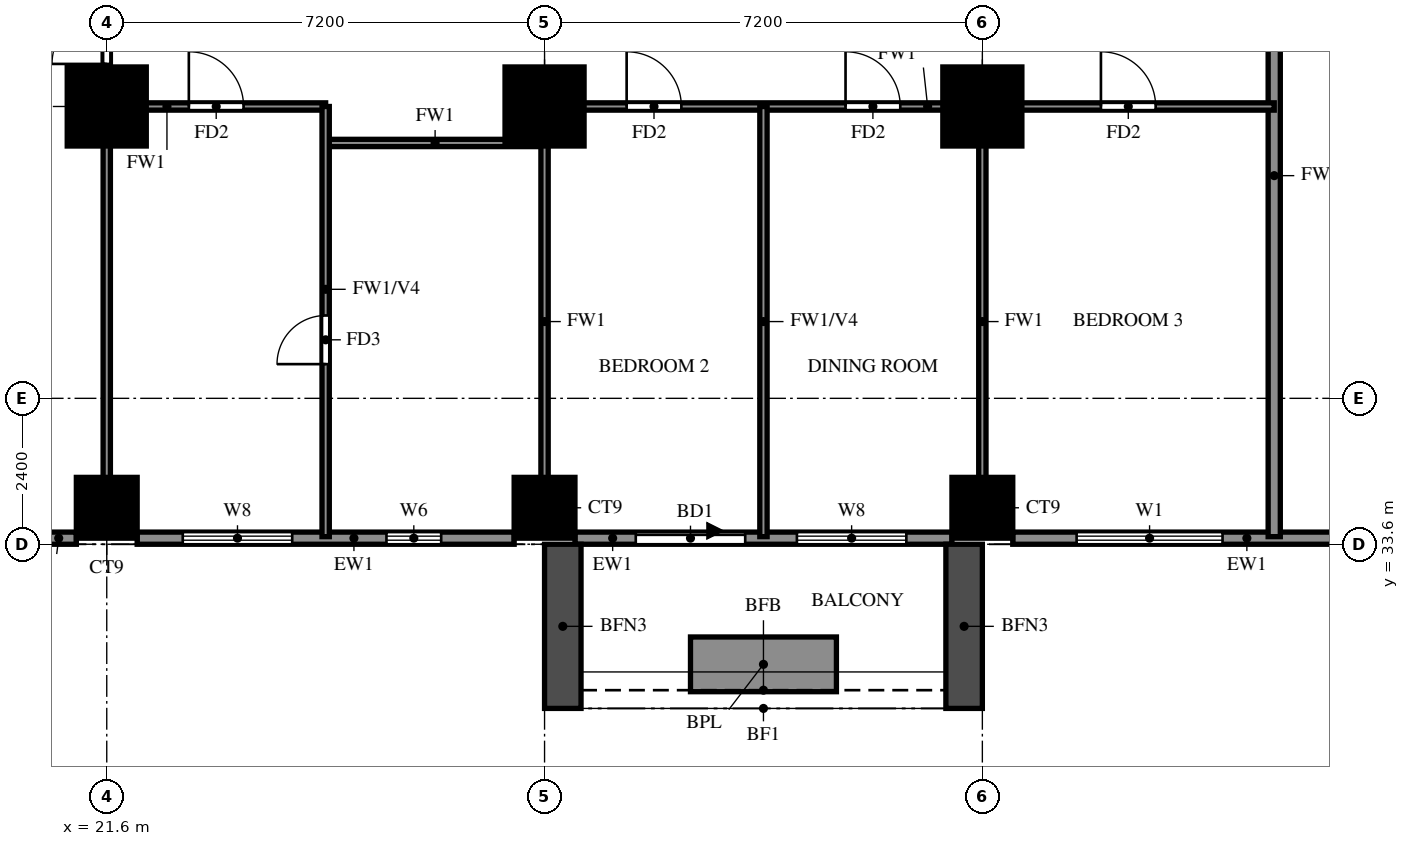
"""IFC4 building model, lengths in metres.
Left out: names, types, materials, properties, quantities, classifications, styles, units other than length and angle.
Written with IfcOpenShell. Run it as: python <this file> out.ifc"""

import sys

from ifc_helpers import new_model, si_unit, direction, frame, frame_2d, origin, origin_2d, place, context, subcontext, project, spatial, rectangle, extrude, source, transform, mapped, element, fill, save


model = new_model("IFC4")
c1 = context("Model", 3, precision=1e-05, world=origin(), true_north=direction((0.0, 1.0)))
c2 = subcontext(c1, "Body", "Model", "MODEL_VIEW")
j1 = project(units=[si_unit("LENGTHUNIT", "METRE"), si_unit("PLANEANGLEUNIT", "RADIAN")], contexts=[c1])
p1 = place(None, origin())
s1 = spatial("IfcSite", under=j1, at=p1, CompositionType="ELEMENT")
p2 = place(p1, origin())
s2 = spatial("IfcBuilding", under=s1, at=p2, CompositionType="ELEMENT")
p3 = place(p2, frame((0.0, 0.0, 83.0)))
s3 = spatial("IfcBuildingStorey", under=s2, at=p3, CompositionType="ELEMENT", Elevation=83.0)
m1 = source(origin(), c2, "Body", "SweptSolid", [
    extrude(rectangle(XDim=1.0, YDim=1.0, at=origin_2d()), origin(), (0.0, 0.0, 1.0), 3.18),
])
for number, where, z_axis, x_axis in (
    (1, (21.6, 34.2, 0.0), (0.0, 0.0, 1.0), (1.0, 0.0, 0.0)),
    (2, (28.8, 34.2, 0.0), (0.0, 0.0, 1.0), (1.0, 0.0, 0.0)),
    (3, (36.0, 34.2, 0.0), (0.0, 0.0, 1.0), (1.0, 0.0, 0.0)),
):
    element("IfcColumn", number, at=place(p3, frame(where, z_axis=z_axis, x_axis=x_axis)), inside=s3, PredefinedType="COLUMN", context=c2, shape_type="MappedRepresentation", body=[
        mapped(m1, transform((0.0, 0.0, 0.0))),
    ])
m2 = source(origin(), c2, "Body", "SweptSolid", [
    extrude(rectangle(XDim=1.3, YDim=1.3, at=origin_2d()), origin(), (0.0, 0.0, 1.0), 3.18),
])
for number, where, z_axis, x_axis in (
    (4, (21.6, 40.8, 0.0), (0.0, 0.0, 1.0), (1.0, 0.0, 0.0)),
    (5, (28.8, 40.8, 0.0), (0.0, 0.0, 1.0), (1.0, 0.0, 0.0)),
    (6, (36.0, 40.8, 0.0), (0.0, 0.0, 1.0), (1.0, 0.0, 0.0)),
):
    element("IfcColumn", number, at=place(p3, frame(where, z_axis=z_axis, x_axis=x_axis)), inside=s3, PredefinedType="COLUMN", context=c2, shape_type="MappedRepresentation", body=[
        mapped(m2, transform((0.0, 0.0, 0.0))),
    ])
p4 = place(p3, frame((18.2, 33.7, 0.0), z_axis=(0.0, 0.0, 1.0), x_axis=(1.0, 0.0, 0.0)))
e7 = element("IfcWall", 7, at=p4, inside=s3, PredefinedType="SOLIDWALL", context=c2, shape_type="SweptSolid", body=[
    extrude(rectangle(XDim=2.9, YDim=0.2, at=frame_2d((1.45, 0.0))), origin(), (0.0, 0.0, 1.0), 3.18),
])
p5 = place(p4, frame((0.55, 0.0, 0.6)))
e8 = element("IfcOpeningElement", 8, at=p5, cuts=e7, PredefinedType="OPENING", context=c2, shape_type="SweptSolid", body=[
    extrude(rectangle(XDim=1.8, YDim=2.4, at=frame_2d((0.9, 1.2))), frame((0.0, 0.11, 0.0), z_axis=(0.0, -1.0, 0.0), x_axis=(1.0, 0.0, 0.0)), (0.0, 0.0, 1.0), 0.22),
])
p6 = place(p3, frame((22.1, 33.7, 0.0), z_axis=(0.0, 0.0, 1.0), x_axis=(1.0, 0.0, 0.0)))
e9 = element("IfcWall", 9, at=p6, inside=s3, PredefinedType="SOLIDWALL", context=c2, shape_type="SweptSolid", body=[
    extrude(rectangle(XDim=6.2, YDim=0.2, at=frame_2d((3.1, 0.0))), origin(), (0.0, 0.0, 1.0), 3.18),
])
p7 = place(p6, frame((0.75, 0.0, 0.6)))
e10 = element("IfcOpeningElement", 10, at=p7, cuts=e9, PredefinedType="OPENING", context=c2, shape_type="SweptSolid", body=[
    extrude(rectangle(XDim=1.8, YDim=2.4, at=frame_2d((0.9, 1.2))), frame((0.0, 0.11, 0.0), z_axis=(0.0, -1.0, 0.0), x_axis=(1.0, 0.0, 0.0)), (0.0, 0.0, 1.0), 0.22),
])
p8 = place(p6, frame((4.1, 0.0, 1.5)))
e11 = element("IfcOpeningElement", 11, at=p8, cuts=e9, PredefinedType="OPENING", context=c2, shape_type="SweptSolid", body=[
    extrude(rectangle(XDim=0.9, YDim=0.9, at=frame_2d((0.45, 0.45))), frame((0.0, 0.11, 0.0), z_axis=(0.0, -1.0, 0.0), x_axis=(1.0, 0.0, 0.0)), (0.0, 0.0, 1.0), 0.22),
])
p9 = place(p3, frame((29.3, 33.7, 0.0), z_axis=(0.0, 0.0, 1.0), x_axis=(1.0, 0.0, 0.0)))
e12 = element("IfcWall", 12, at=p9, inside=s3, PredefinedType="SOLIDWALL", context=c2, shape_type="SweptSolid", body=[
    extrude(rectangle(XDim=6.2, YDim=0.2, at=frame_2d((3.1, 0.0))), origin(), (0.0, 0.0, 1.0), 3.18),
])
p10 = place(p9, frame((1.0, 0.0, 0.0)))
e13 = element("IfcOpeningElement", 13, at=p10, cuts=e12, PredefinedType="OPENING", context=c2, shape_type="SweptSolid", body=[
    extrude(rectangle(XDim=1.8, YDim=2.4, at=frame_2d((0.9, 1.2))), frame((0.0, 0.11, 0.0), z_axis=(0.0, -1.0, 0.0), x_axis=(1.0, 0.0, 0.0)), (0.0, 0.0, 1.0), 0.22),
])
p11 = place(p9, frame((3.65, 0.0, 0.6)))
e14 = element("IfcOpeningElement", 14, at=p11, cuts=e12, PredefinedType="OPENING", context=c2, shape_type="SweptSolid", body=[
    extrude(rectangle(XDim=1.8, YDim=2.4, at=frame_2d((0.9, 1.2))), frame((0.0, 0.11, 0.0), z_axis=(0.0, -1.0, 0.0), x_axis=(1.0, 0.0, 0.0)), (0.0, 0.0, 1.0), 0.22),
])
p12 = place(p3, frame((36.5, 33.7, 0.0), z_axis=(0.0, 0.0, 1.0), x_axis=(1.0, 0.0, 0.0)))
e15 = element("IfcWall", 15, at=p12, inside=s3, PredefinedType="SOLIDWALL", context=c2, shape_type="SweptSolid", body=[
    extrude(rectangle(XDim=5.5, YDim=0.2, at=frame_2d((2.75, 0.0))), origin(), (0.0, 0.0, 1.0), 3.18),
])
p13 = place(p12, frame((1.05, 0.0, 0.6)))
e16 = element("IfcOpeningElement", 16, at=p13, cuts=e15, PredefinedType="OPENING", context=c2, shape_type="SweptSolid", body=[
    extrude(rectangle(XDim=2.4, YDim=2.4, at=frame_2d((1.2, 1.2))), frame((0.0, 0.11, 0.0), z_axis=(0.0, -1.0, 0.0), x_axis=(1.0, 0.0, 0.0)), (0.0, 0.0, 1.0), 0.22),
])
for number, where, z_axis, x_axis in (
    (17, (29.1, 33.6, 0.0), (0.0, 0.0, 1.0), (0.0, -1.0, 0.0)),
    (18, (35.7, 33.6, 0.0), (0.0, 0.0, 1.0), (0.0, -1.0, 0.0)),
):
    element("IfcWall", number, at=place(p3, frame(where, z_axis=z_axis, x_axis=x_axis)), inside=s3, PredefinedType="SOLIDWALL", context=c2, shape_type="SweptSolid", body=[
        extrude(rectangle(XDim=2.7, YDim=0.6, at=frame_2d((1.35, 0.0))), origin(), (0.0, 0.0, 1.0), 2.85),
    ])
p14 = place(p3, frame((31.2, 31.625, 0.0), z_axis=(0.0, 0.0, 1.0), x_axis=(1.0, 0.0, 0.0)))
e19 = element("IfcWall", 19, at=p14, inside=s3, PredefinedType="SOLIDWALL", context=c2, shape_type="SweptSolid", body=[
    extrude(rectangle(XDim=2.4, YDim=0.9, at=frame_2d((1.2, 0.0))), origin(), (0.0, 0.0, 1.0), 0.9),
])
p15 = place(p3, frame((40.8, 33.725, 0.0), z_axis=(0.0, 0.0, 1.0), x_axis=(0.0, 1.0, 0.0)))
e20 = element("IfcWall", 20, at=p15, inside=s3, PredefinedType="SOLIDWALL", context=c2, shape_type="SweptSolid", body=[
    extrude(rectangle(XDim=11.875, YDim=0.2, at=frame_2d((5.938, 0.0))), origin(), (0.0, 0.0, 1.0), 2.28),
])
p16 = place(p3, frame((25.2, 40.2, 0.0), z_axis=(0.0, 0.0, 1.0), x_axis=(1.0, 0.0, 0.0)))
e21 = element("IfcWall", 21, at=p16, inside=s3, PredefinedType="PARTITIONING", context=c2, shape_type="SweptSolid", body=[
    extrude(rectangle(XDim=3.6, YDim=0.12, at=frame_2d((1.8, 0.0))), origin(), (0.0, 0.0, 1.0), 3.18),
])
p17 = place(p3, frame((21.6, 40.8, 0.0), z_axis=(0.0, 0.0, 1.0), x_axis=(1.0, 0.0, 0.0)))
e22 = element("IfcWall", 22, at=p17, inside=s3, PredefinedType="PARTITIONING", context=c2, shape_type="SweptSolid", body=[
    extrude(rectangle(XDim=3.6, YDim=0.12, at=frame_2d((1.8, 0.0))), origin(), (0.0, 0.0, 1.0), 3.18),
])
p18 = place(p17, frame((1.35, 0.0, 0.0)))
e23 = element("IfcOpeningElement", 23, at=p18, cuts=e22, PredefinedType="OPENING", context=c2, shape_type="SweptSolid", body=[
    extrude(rectangle(XDim=0.9, YDim=2.1, at=frame_2d((0.45, 1.05))), frame((0.0, 0.07, 0.0), z_axis=(0.0, -1.0, 0.0), x_axis=(1.0, 0.0, 0.0)), (0.0, 0.0, 1.0), 0.14),
])
p19 = place(p3, frame((28.8, 40.8, 0.0), z_axis=(0.0, 0.0, 1.0), x_axis=(1.0, 0.0, 0.0)))
e24 = element("IfcWall", 24, at=p19, inside=s3, PredefinedType="PARTITIONING", context=c2, shape_type="SweptSolid", body=[
    extrude(rectangle(XDim=12.0, YDim=0.12, at=frame_2d((6.0, 0.0))), origin(), (0.0, 0.0, 1.0), 3.18),
])
p20 = place(p19, frame((1.35, 0.0, 0.0)))
e25 = element("IfcOpeningElement", 25, at=p20, cuts=e24, PredefinedType="OPENING", context=c2, shape_type="SweptSolid", body=[
    extrude(rectangle(XDim=0.9, YDim=2.1, at=frame_2d((0.45, 1.05))), frame((0.0, 0.07, 0.0), z_axis=(0.0, -1.0, 0.0), x_axis=(1.0, 0.0, 0.0)), (0.0, 0.0, 1.0), 0.14),
])
p21 = place(p19, frame((4.95, 0.0, 0.0)))
e26 = element("IfcOpeningElement", 26, at=p21, cuts=e24, PredefinedType="OPENING", context=c2, shape_type="SweptSolid", body=[
    extrude(rectangle(XDim=0.9, YDim=2.1, at=frame_2d((0.45, 1.05))), frame((0.0, 0.07, 0.0), z_axis=(0.0, -1.0, 0.0), x_axis=(1.0, 0.0, 0.0)), (0.0, 0.0, 1.0), 0.14),
])
p22 = place(p19, frame((9.15, 0.0, 0.0)))
e27 = element("IfcOpeningElement", 27, at=p22, cuts=e24, PredefinedType="OPENING", context=c2, shape_type="SweptSolid", body=[
    extrude(rectangle(XDim=0.9, YDim=2.1, at=frame_2d((0.45, 1.05))), frame((0.0, 0.07, 0.0), z_axis=(0.0, -1.0, 0.0), x_axis=(1.0, 0.0, 0.0)), (0.0, 0.0, 1.0), 0.14),
])
p23 = place(p3, frame((21.6, 33.725, 0.0), z_axis=(0.0, 0.0, 1.0), x_axis=(0.0, 1.0, 0.0)))
e28 = element("IfcWall", 28, at=p23, inside=s3, PredefinedType="PARTITIONING", context=c2, shape_type="SweptSolid", body=[
    extrude(rectangle(XDim=32.275, YDim=0.12, at=frame_2d((16.137, 0.0))), origin(), (0.0, 0.0, 1.0), 3.18),
])
p24 = place(p23, frame((7.775, 0.0, 0.0)))
e29 = element("IfcOpeningElement", 29, at=p24, cuts=e28, PredefinedType="OPENING", context=c2, shape_type="SweptSolid", body=[
    extrude(rectangle(XDim=0.9, YDim=2.1, at=frame_2d((0.45, 1.05))), frame((0.0, 0.07, 0.0), z_axis=(0.0, -1.0, 0.0), x_axis=(1.0, 0.0, 0.0)), (0.0, 0.0, 1.0), 0.14),
])
p25 = place(p23, frame((15.625, 0.0, 0.0)))
e30 = element("IfcOpeningElement", 30, at=p25, cuts=e28, PredefinedType="OPENING", context=c2, shape_type="SweptSolid", body=[
    extrude(rectangle(XDim=0.9, YDim=2.1, at=frame_2d((0.45, 1.05))), frame((0.0, 0.07, 0.0), z_axis=(0.0, -1.0, 0.0), x_axis=(1.0, 0.0, 0.0)), (0.0, 0.0, 1.0), 0.14),
])
p26 = place(p23, frame((22.225, 0.0, 0.0)))
e31 = element("IfcOpeningElement", 31, at=p26, cuts=e28, PredefinedType="OPENING", context=c2, shape_type="SweptSolid", body=[
    extrude(rectangle(XDim=1.5, YDim=2.1, at=frame_2d((0.75, 1.05))), frame((0.0, 0.07, 0.0), z_axis=(0.0, -1.0, 0.0), x_axis=(1.0, 0.0, 0.0)), (0.0, 0.0, 1.0), 0.14),
])
p27 = place(p23, frame((26.425, 0.0, 0.0)))
e32 = element("IfcOpeningElement", 32, at=p27, cuts=e28, PredefinedType="OPENING", context=c2, shape_type="SweptSolid", body=[
    extrude(rectangle(XDim=0.9, YDim=2.1, at=frame_2d((0.45, 1.05))), frame((0.0, 0.07, 0.0), z_axis=(0.0, -1.0, 0.0), x_axis=(1.0, 0.0, 0.0)), (0.0, 0.0, 1.0), 0.14),
])
p28 = place(p23, frame((30.025, 0.0, 0.0)))
e33 = element("IfcOpeningElement", 33, at=p28, cuts=e28, PredefinedType="OPENING", context=c2, shape_type="SweptSolid", body=[
    extrude(rectangle(XDim=0.9, YDim=2.1, at=frame_2d((0.45, 1.05))), frame((0.0, 0.07, 0.0), z_axis=(0.0, -1.0, 0.0), x_axis=(1.0, 0.0, 0.0)), (0.0, 0.0, 1.0), 0.14),
])
p29 = place(p3, frame((25.2, 33.725, 0.0), z_axis=(0.0, 0.0, 1.0), x_axis=(0.0, 1.0, 0.0)))
e34 = element("IfcWall", 34, at=p29, inside=s3, PredefinedType="PARTITIONING", context=c2, shape_type="SweptSolid", body=[
    extrude(rectangle(XDim=7.075, YDim=0.12, at=frame_2d((3.538, 0.0))), origin(), (0.0, 0.0, 1.0), 2.28),
])
p30 = place(p29, frame((2.837, 0.0, 0.0)))
e35 = element("IfcOpeningElement", 35, at=p30, cuts=e34, PredefinedType="OPENING", context=c2, shape_type="SweptSolid", body=[
    extrude(rectangle(XDim=0.8, YDim=2.1, at=frame_2d((0.4, 1.05))), frame((0.0, 0.07, 0.0), z_axis=(0.0, -1.0, 0.0), x_axis=(1.0, 0.0, 0.0)), (0.0, 0.0, 1.0), 0.14),
])
p31 = place(p3, frame((28.8, 33.725, 0.0), z_axis=(0.0, 0.0, 1.0), x_axis=(0.0, 1.0, 0.0)))
e36 = element("IfcWall", 36, at=p31, inside=s3, PredefinedType="PARTITIONING", context=c2, shape_type="SweptSolid", body=[
    extrude(rectangle(XDim=7.075, YDim=0.12, at=frame_2d((3.538, 0.0))), origin(), (0.0, 0.0, 1.0), 3.18),
])
p32 = place(p3, frame((32.4, 33.725, 0.0), z_axis=(0.0, 0.0, 1.0), x_axis=(0.0, 1.0, 0.0)))
e37 = element("IfcWall", 37, at=p32, inside=s3, PredefinedType="PARTITIONING", context=c2, shape_type="SweptSolid", body=[
    extrude(rectangle(XDim=7.075, YDim=0.12, at=frame_2d((3.538, 0.0))), origin(), (0.0, 0.0, 1.0), 2.28),
])
p33 = place(p3, frame((36.0, 33.725, 0.0), z_axis=(0.0, 0.0, 1.0), x_axis=(0.0, 1.0, 0.0)))
e38 = element("IfcWall", 38, at=p33, inside=s3, PredefinedType="PARTITIONING", context=c2, shape_type="SweptSolid", body=[
    extrude(rectangle(XDim=7.075, YDim=0.12, at=frame_2d((3.538, 0.0))), origin(), (0.0, 0.0, 1.0), 3.18),
])
p34 = place(p7, origin())
e39 = element("IfcWindow", 39, at=p34, inside=s3, PartitioningType="DOUBLE_PANEL_VERTICAL", PredefinedType="WINDOW", context=c2, shape_type="SweptSolid", body=[
    extrude(rectangle(XDim=1.8, YDim=2.4, at=frame_2d((0.9, 1.2))), frame((0.0, 0.03, 0.0), z_axis=(0.0, -1.0, 0.0), x_axis=(1.0, 0.0, 0.0)), (0.0, 0.0, 1.0), 0.06),
])
fill(e10, e39)
p35 = place(p8, origin())
e40 = element("IfcWindow", 40, at=p35, inside=s3, PartitioningType="SINGLE_PANEL", PredefinedType="WINDOW", context=c2, shape_type="SweptSolid", body=[
    extrude(rectangle(XDim=0.9, YDim=0.9, at=frame_2d((0.45, 0.45))), frame((0.0, 0.03, 0.0), z_axis=(0.0, -1.0, 0.0), x_axis=(1.0, 0.0, 0.0)), (0.0, 0.0, 1.0), 0.06),
])
fill(e11, e40)
p36 = place(p10, origin())
e41 = element("IfcDoor", 41, at=p36, inside=s3, OperationType="DOUBLE_DOOR_SLIDING", PredefinedType="DOOR", context=c2, shape_type="SweptSolid", body=[
    extrude(rectangle(XDim=1.8, YDim=2.4, at=frame_2d((0.9, 1.2))), frame((0.0, 0.025, 0.0), z_axis=(0.0, -1.0, 0.0), x_axis=(1.0, 0.0, 0.0)), (0.0, 0.0, 1.0), 0.05),
])
fill(e13, e41)
p37 = place(p11, origin())
e42 = element("IfcWindow", 42, at=p37, inside=s3, PartitioningType="DOUBLE_PANEL_VERTICAL", PredefinedType="WINDOW", context=c2, shape_type="SweptSolid", body=[
    extrude(rectangle(XDim=1.8, YDim=2.4, at=frame_2d((0.9, 1.2))), frame((0.0, 0.03, 0.0), z_axis=(0.0, -1.0, 0.0), x_axis=(1.0, 0.0, 0.0)), (0.0, 0.0, 1.0), 0.06),
])
fill(e14, e42)
p38 = place(p13, origin())
e43 = element("IfcWindow", 43, at=p38, inside=s3, PartitioningType="DOUBLE_PANEL_VERTICAL", PredefinedType="WINDOW", context=c2, shape_type="SweptSolid", body=[
    extrude(rectangle(XDim=2.4, YDim=2.4, at=frame_2d((1.2, 1.2))), frame((0.0, 0.03, 0.0), z_axis=(0.0, -1.0, 0.0), x_axis=(1.0, 0.0, 0.0)), (0.0, 0.0, 1.0), 0.06),
])
fill(e16, e43)
p39 = place(p24, origin())
e44 = element("IfcDoor", 44, at=p39, inside=s3, OperationType="SINGLE_SWING_RIGHT", PredefinedType="DOOR", context=c2, shape_type="SweptSolid", body=[
    extrude(rectangle(XDim=0.9, YDim=2.1, at=frame_2d((0.45, 1.05))), frame((0.0, 0.025, 0.0), z_axis=(0.0, -1.0, 0.0), x_axis=(1.0, 0.0, 0.0)), (0.0, 0.0, 1.0), 0.05),
])
fill(e29, e44)
p40 = place(p18, origin())
e45 = element("IfcDoor", 45, at=p40, inside=s3, OperationType="SINGLE_SWING_LEFT", PredefinedType="DOOR", context=c2, shape_type="SweptSolid", body=[
    extrude(rectangle(XDim=0.9, YDim=2.1, at=frame_2d((0.45, 1.05))), frame((0.0, 0.025, 0.0), z_axis=(0.0, -1.0, 0.0), x_axis=(1.0, 0.0, 0.0)), (0.0, 0.0, 1.0), 0.05),
])
fill(e23, e45)
p41 = place(p30, origin())
e46 = element("IfcDoor", 46, at=p41, inside=s3, OperationType="SINGLE_SWING_RIGHT", PredefinedType="DOOR", context=c2, shape_type="SweptSolid", body=[
    extrude(rectangle(XDim=0.8, YDim=2.1, at=frame_2d((0.4, 1.05))), frame((0.0, 0.025, 0.0), z_axis=(0.0, -1.0, 0.0), x_axis=(1.0, 0.0, 0.0)), (0.0, 0.0, 1.0), 0.05),
])
fill(e35, e46)
p42 = place(p20, origin())
e47 = element("IfcDoor", 47, at=p42, inside=s3, OperationType="SINGLE_SWING_LEFT", PredefinedType="DOOR", context=c2, shape_type="SweptSolid", body=[
    extrude(rectangle(XDim=0.9, YDim=2.1, at=frame_2d((0.45, 1.05))), frame((0.0, 0.025, 0.0), z_axis=(0.0, -1.0, 0.0), x_axis=(1.0, 0.0, 0.0)), (0.0, 0.0, 1.0), 0.05),
])
fill(e25, e47)
p43 = place(p21, origin())
e48 = element("IfcDoor", 48, at=p43, inside=s3, OperationType="SINGLE_SWING_LEFT", PredefinedType="DOOR", context=c2, shape_type="SweptSolid", body=[
    extrude(rectangle(XDim=0.9, YDim=2.1, at=frame_2d((0.45, 1.05))), frame((0.0, 0.025, 0.0), z_axis=(0.0, -1.0, 0.0), x_axis=(1.0, 0.0, 0.0)), (0.0, 0.0, 1.0), 0.05),
])
fill(e26, e48)
p44 = place(p22, origin())
e49 = element("IfcDoor", 49, at=p44, inside=s3, OperationType="SINGLE_SWING_RIGHT", PredefinedType="DOOR", context=c2, shape_type="SweptSolid", body=[
    extrude(rectangle(XDim=0.9, YDim=2.1, at=frame_2d((0.45, 1.05))), frame((0.0, 0.025, 0.0), z_axis=(0.0, -1.0, 0.0), x_axis=(1.0, 0.0, 0.0)), (0.0, 0.0, 1.0), 0.05),
])
fill(e27, e49)
save(model, sys.argv[1])
